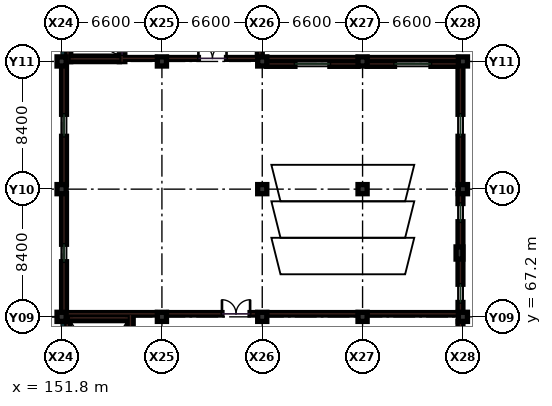
"""IFC4 building model, lengths in metres.
Left out: names, types, materials, properties, quantities, classifications, styles, units other than length and angle.
Written with IfcOpenShell. Run it as: python <this file> out.ifc"""

import sys

from ifc_helpers import new_model, si_unit, direction, frame, frame_2d, origin, origin_2d, place, context, subcontext, project, spatial, rectangle, extrude, element, fill, save


model = new_model("IFC4")
c1 = context("Model", 3, precision=1e-05, world=origin(), true_north=direction((0.0, 1.0)))
c2 = subcontext(c1, "Body", "Model", "MODEL_VIEW")
j1 = project(units=[si_unit("LENGTHUNIT", "METRE"), si_unit("PLANEANGLEUNIT", "RADIAN")], contexts=[c1])
p1 = place(None, origin())
s1 = spatial("IfcSite", under=j1, at=p1, CompositionType="ELEMENT")
p2 = place(p1, origin())
s2 = spatial("IfcBuilding", under=s1, at=p2, CompositionType="ELEMENT")
p3 = place(p2, origin())
s3 = spatial("IfcBuildingStorey", under=s2, at=p3, CompositionType="ELEMENT", Elevation=0.0)
for number, where, z_axis, x_axis in (
    (1, (151.8, 67.2, 0.0), (0.0, 0.0, 1.0), (1.0, 0.0, 0.0)),
    (2, (151.8, 75.6, 0.0), (0.0, 0.0, 1.0), (1.0, 0.0, 0.0)),
    (3, (151.8, 84.0, 0.0), (0.0, 0.0, 1.0), (1.0, 0.0, 0.0)),
    (4, (158.4, 67.2, 0.0), (0.0, 0.0, 1.0), (1.0, 0.0, 0.0)),
    (5, (158.4, 84.0, 0.0), (0.0, 0.0, 1.0), (1.0, 0.0, 0.0)),
    (6, (165.0, 67.2, 0.0), (0.0, 0.0, 1.0), (1.0, 0.0, 0.0)),
    (7, (165.0, 75.6, 0.0), (0.0, 0.0, 1.0), (1.0, 0.0, 0.0)),
    (8, (165.0, 84.0, 0.0), (0.0, 0.0, 1.0), (1.0, 0.0, 0.0)),
    (9, (171.6, 67.2, 0.0), (0.0, 0.0, 1.0), (1.0, 0.0, 0.0)),
    (10, (171.6, 75.6, 0.0), (0.0, 0.0, 1.0), (1.0, 0.0, 0.0)),
    (11, (171.6, 84.0, 0.0), (0.0, 0.0, 1.0), (1.0, 0.0, 0.0)),
    (12, (178.2, 67.2, 0.0), (0.0, 0.0, 1.0), (1.0, 0.0, 0.0)),
    (13, (178.2, 75.6, 0.0), (0.0, 0.0, 1.0), (1.0, 0.0, 0.0)),
    (14, (178.2, 84.0, 0.0), (0.0, 0.0, 1.0), (1.0, 0.0, 0.0)),
):
    element("IfcColumn", number, at=place(p3, frame(where, z_axis=z_axis, x_axis=x_axis)), inside=s3, PredefinedType="COLUMN", context=c2, shape_type="SweptSolid", body=[
        extrude(rectangle(XDim=0.6, YDim=0.6, at=origin_2d()), origin(), (0.0, 0.0, 1.0), 5.4),
    ])
p4 = place(p3, frame((177.975, 71.4, 0.0), z_axis=(0.0, 0.0, 1.0), x_axis=(1.0, 0.0, 0.0)))
e15 = element("IfcColumn", 15, at=p4, inside=s3, PredefinedType="PILASTER", context=c2, shape_type="SweptSolid", body=[
    extrude(rectangle(XDim=0.45, YDim=0.8, at=origin_2d()), origin(), (0.0, 0.0, 1.0), 5.4),
])
p5 = place(p3, frame((152.0, 67.4, 0.0), z_axis=(0.0, 0.0, 1.0), x_axis=(1.0, 0.0, 0.0)))
e16 = element("IfcWall", 16, at=p5, inside=s3, PredefinedType="PARTITIONING", context=c2, shape_type="SweptSolid", body=[
    extrude(rectangle(XDim=5.95, YDim=0.16, at=frame_2d((2.975, 0.0))), origin(), (0.0, 0.0, 1.0), 4.25),
])
p6 = place(p3, frame((158.85, 67.4, 0.0), z_axis=(0.0, 0.0, 1.0), x_axis=(1.0, 0.0, 0.0)))
e17 = element("IfcWall", 17, at=p6, inside=s3, PredefinedType="PARTITIONING", context=c2, shape_type="SweptSolid", body=[
    extrude(rectangle(XDim=5.7, YDim=0.16, at=frame_2d((2.85, 0.0))), origin(), (0.0, 0.0, 1.0), 4.235),
])
p7 = place(p6, frame((3.5, 0.0, 0.0)))
e18 = element("IfcOpeningElement", 18, at=p7, cuts=e17, PredefinedType="OPENING", context=c2, shape_type="SweptSolid", body=[
    extrude(rectangle(XDim=1.85, YDim=2.25, at=frame_2d((0.925, 1.125))), frame((0.0, 0.09, 0.0), z_axis=(0.0, -1.0, 0.0), x_axis=(1.0, 0.0, 0.0)), (0.0, 0.0, 1.0), 0.18),
])
p8 = place(p3, frame((165.45, 67.4, 0.0), z_axis=(0.0, 0.0, 1.0), x_axis=(1.0, 0.0, 0.0)))
e19 = element("IfcWall", 19, at=p8, inside=s3, PredefinedType="PARTITIONING", context=c2, shape_type="SweptSolid", body=[
    extrude(rectangle(XDim=5.7, YDim=0.16, at=frame_2d((2.85, 0.0))), origin(), (0.0, 0.0, 1.0), 4.235),
])
p9 = place(p3, frame((172.05, 67.4, 0.0), z_axis=(0.0, 0.0, 1.0), x_axis=(1.0, 0.0, 0.0)))
e20 = element("IfcWall", 20, at=p9, inside=s3, PredefinedType="PARTITIONING", context=c2, shape_type="SweptSolid", body=[
    extrude(rectangle(XDim=5.83, YDim=0.16, at=frame_2d((2.915, 0.0))), origin(), (0.0, 0.0, 1.0), 4.235),
])
p10 = place(p3, frame((155.8, 84.2, 0.0), z_axis=(0.0, 0.0, 1.0), x_axis=(1.0, 0.0, 0.0)))
e21 = element("IfcWall", 21, at=p10, inside=s3, PredefinedType="PARTITIONING", context=c2, shape_type="SweptSolid", body=[
    extrude(rectangle(XDim=2.15, YDim=0.12, at=frame_2d((1.075, 0.0))), origin(), (0.0, 0.0, 1.0), 4.235),
])
p11 = place(p3, frame((158.85, 84.2, 0.0), z_axis=(0.0, 0.0, 1.0), x_axis=(1.0, 0.0, 0.0)))
e22 = element("IfcWall", 22, at=p11, inside=s3, PredefinedType="PARTITIONING", context=c2, shape_type="SweptSolid", body=[
    extrude(rectangle(XDim=5.7, YDim=0.12, at=frame_2d((2.85, 0.0))), origin(), (0.0, 0.0, 1.0), 4.235),
])
p12 = place(p11, frame((1.95, 0.0, 0.0)))
e23 = element("IfcOpeningElement", 23, at=p12, cuts=e22, PredefinedType="OPENING", context=c2, shape_type="SweptSolid", body=[
    extrude(rectangle(XDim=1.85, YDim=2.25, at=frame_2d((0.925, 1.125))), frame((0.0, 0.07, 0.0), z_axis=(0.0, -1.0, 0.0), x_axis=(1.0, 0.0, 0.0)), (0.0, 0.0, 1.0), 0.14),
])
p13 = place(p3, frame((165.45, 84.2, 0.0), z_axis=(0.0, 0.0, 1.0), x_axis=(1.0, 0.0, 0.0)))
e24 = element("IfcWall", 24, at=p13, inside=s3, PredefinedType="PARTITIONING", context=c2, shape_type="SweptSolid", body=[
    extrude(rectangle(XDim=5.7, YDim=0.12, at=frame_2d((2.85, 0.0))), origin(), (0.0, 0.0, 1.0), 4.25),
])
p14 = place(p3, frame((172.05, 84.2, 0.0), z_axis=(0.0, 0.0, 1.0), x_axis=(1.0, 0.0, 0.0)))
e25 = element("IfcWall", 25, at=p14, inside=s3, PredefinedType="PARTITIONING", context=c2, shape_type="SweptSolid", body=[
    extrude(rectangle(XDim=5.83, YDim=0.12, at=frame_2d((2.915, 0.0))), origin(), (0.0, 0.0, 1.0), 4.25),
])
p15 = place(p3, frame((151.96, 75.305, 0.0), z_axis=(0.0, 0.0, 1.0), x_axis=(0.0, -1.0, 0.0)))
e26 = element("IfcWall", 26, at=p15, inside=s3, PredefinedType="SOLIDWALL", context=c2, shape_type="SweptSolid", body=[
    extrude(rectangle(XDim=7.81, YDim=0.32, at=frame_2d((3.905, 0.0))), origin(), (0.0, 0.0, 1.0), 4.335),
])
p16 = place(p15, frame((3.33, 0.0, 0.95)))
e27 = element("IfcOpeningElement", 27, at=p16, cuts=e26, PredefinedType="OPENING", context=c2, shape_type="SweptSolid", body=[
    extrude(rectangle(XDim=1.15, YDim=1.6, at=frame_2d((0.575, 0.8))), frame((0.0, 0.17, 0.0), z_axis=(0.0, -1.0, 0.0), x_axis=(1.0, 0.0, 0.0)), (0.0, 0.0, 1.0), 0.34),
])
p17 = place(p3, frame((151.96, 83.705, 0.0), z_axis=(0.0, 0.0, 1.0), x_axis=(0.0, -1.0, 0.0)))
e28 = element("IfcWall", 28, at=p17, inside=s3, PredefinedType="SOLIDWALL", context=c2, shape_type="SweptSolid", body=[
    extrude(rectangle(XDim=7.81, YDim=0.32, at=frame_2d((3.905, 0.0))), origin(), (0.0, 0.0, 1.0), 4.335),
])
p18 = place(p17, frame((3.18, 0.0, 0.95)))
e29 = element("IfcOpeningElement", 29, at=p18, cuts=e28, PredefinedType="OPENING", context=c2, shape_type="SweptSolid", body=[
    extrude(rectangle(XDim=1.45, YDim=1.6, at=frame_2d((0.725, 0.8))), frame((0.0, 0.17, 0.0), z_axis=(0.0, -1.0, 0.0), x_axis=(1.0, 0.0, 0.0)), (0.0, 0.0, 1.0), 0.34),
])
p19 = place(p3, frame((164.84, 84.295, 0.0), z_axis=(0.0, 0.0, 1.0), x_axis=(0.0, 1.0, 0.0)))
e30 = element("IfcWall", 30, at=p19, inside=s3, PredefinedType="SOLIDWALL", context=c2, shape_type="SweptSolid", body=[
    extrude(rectangle(XDim=7.81, YDim=0.32, at=frame_2d((3.905, 0.0))), origin(), (0.0, 0.0, 1.0), 4.335),
])
p20 = place(p19, frame((3.005, 0.0, 0.95)))
e31 = element("IfcOpeningElement", 31, at=p20, cuts=e30, PredefinedType="OPENING", context=c2, shape_type="SweptSolid", body=[
    extrude(rectangle(XDim=1.8, YDim=1.6, at=frame_2d((0.9, 0.8))), frame((0.0, 0.17, 0.0), z_axis=(0.0, -1.0, 0.0), x_axis=(1.0, 0.0, 0.0)), (0.0, 0.0, 1.0), 0.34),
])
p21 = place(p3, frame((171.305, 83.84, 0.0), z_axis=(0.0, 0.0, 1.0), x_axis=(-1.0, 0.0, 0.0)))
e32 = element("IfcWall", 32, at=p21, inside=s3, PredefinedType="SOLIDWALL", context=c2, shape_type="SweptSolid", body=[
    extrude(rectangle(XDim=6.01, YDim=0.32, at=frame_2d((3.005, 0.0))), origin(), (0.0, 0.0, 1.0), 4.385),
])
p22 = place(p21, frame((1.855, 0.0, 0.95)))
e33 = element("IfcOpeningElement", 33, at=p22, cuts=e32, PredefinedType="OPENING", context=c2, shape_type="SweptSolid", body=[
    extrude(rectangle(XDim=2.3, YDim=1.95, at=frame_2d((1.15, 0.975))), frame((0.0, 0.17, 0.0), z_axis=(0.0, -1.0, 0.0), x_axis=(1.0, 0.0, 0.0)), (0.0, 0.0, 1.0), 0.34),
])
p23 = place(p3, frame((178.04, 59.195, 0.0), z_axis=(0.0, 0.0, 1.0), x_axis=(0.0, 1.0, 0.0)))
e34 = element("IfcWall", 34, at=p23, inside=s3, PredefinedType="SOLIDWALL", context=c2, shape_type="SweptSolid", body=[
    extrude(rectangle(XDim=7.71, YDim=0.32, at=frame_2d((3.855, 0.0))), origin(), (0.0, 0.0, 1.0), 4.335),
])
p24 = place(p23, frame((0.65, 0.0, 0.95)))
e35 = element("IfcOpeningElement", 35, at=p24, cuts=e34, PredefinedType="OPENING", context=c2, shape_type="SweptSolid", body=[
    extrude(rectangle(XDim=1.2, YDim=1.5, at=frame_2d((0.6, 0.75))), frame((0.0, 0.17, 0.0), z_axis=(0.0, -1.0, 0.0), x_axis=(1.0, 0.0, 0.0)), (0.0, 0.0, 1.0), 0.34),
])
p25 = place(p23, frame((5.86, 0.0, 0.95)))
e36 = element("IfcOpeningElement", 36, at=p25, cuts=e34, PredefinedType="OPENING", context=c2, shape_type="SweptSolid", body=[
    extrude(rectangle(XDim=1.2, YDim=1.5, at=frame_2d((0.6, 0.75))), frame((0.0, 0.17, 0.0), z_axis=(0.0, -1.0, 0.0), x_axis=(1.0, 0.0, 0.0)), (0.0, 0.0, 1.0), 0.34),
])
p26 = place(p3, frame((178.04, 67.495, 0.0), z_axis=(0.0, 0.0, 1.0), x_axis=(0.0, 1.0, 0.0)))
e37 = element("IfcWall", 37, at=p26, inside=s3, PredefinedType="SOLIDWALL", context=c2, shape_type="SweptSolid", body=[
    extrude(rectangle(XDim=7.81, YDim=0.32, at=frame_2d((3.905, 0.0))), origin(), (0.0, 0.0, 1.0), 4.335),
])
p27 = place(p26, frame((0.65, 0.0, 0.95)))
e38 = element("IfcOpeningElement", 38, at=p27, cuts=e37, PredefinedType="OPENING", context=c2, shape_type="SweptSolid", body=[
    extrude(rectangle(XDim=1.2, YDim=1.5, at=frame_2d((0.6, 0.75))), frame((0.0, 0.17, 0.0), z_axis=(0.0, -1.0, 0.0), x_axis=(1.0, 0.0, 0.0)), (0.0, 0.0, 1.0), 0.34),
])
p28 = place(p26, frame((5.96, 0.0, 0.95)))
e39 = element("IfcOpeningElement", 39, at=p28, cuts=e37, PredefinedType="OPENING", context=c2, shape_type="SweptSolid", body=[
    extrude(rectangle(XDim=1.2, YDim=1.5, at=frame_2d((0.6, 0.75))), frame((0.0, 0.17, 0.0), z_axis=(0.0, -1.0, 0.0), x_axis=(1.0, 0.0, 0.0)), (0.0, 0.0, 1.0), 0.34),
])
p29 = place(p3, frame((178.04, 75.895, 0.0), z_axis=(0.0, 0.0, 1.0), x_axis=(0.0, 1.0, 0.0)))
e40 = element("IfcWall", 40, at=p29, inside=s3, PredefinedType="SOLIDWALL", context=c2, shape_type="SweptSolid", body=[
    extrude(rectangle(XDim=7.81, YDim=0.32, at=frame_2d((3.905, 0.0))), origin(), (0.0, 0.0, 1.0), 4.335),
])
p30 = place(p29, frame((3.18, 0.0, 0.95)))
e41 = element("IfcOpeningElement", 41, at=p30, cuts=e40, PredefinedType="OPENING", context=c2, shape_type="SweptSolid", body=[
    extrude(rectangle(XDim=1.45, YDim=1.6, at=frame_2d((0.725, 0.8))), frame((0.0, 0.17, 0.0), z_axis=(0.0, -1.0, 0.0), x_axis=(1.0, 0.0, 0.0)), (0.0, 0.0, 1.0), 0.34),
])
p31 = place(p3, frame((177.905, 83.84, 0.0), z_axis=(0.0, 0.0, 1.0), x_axis=(-1.0, 0.0, 0.0)))
e42 = element("IfcWall", 42, at=p31, inside=s3, PredefinedType="SOLIDWALL", context=c2, shape_type="SweptSolid", body=[
    extrude(rectangle(XDim=6.01, YDim=0.32, at=frame_2d((3.005, 0.0))), origin(), (0.0, 0.0, 1.0), 4.385),
])
p32 = place(p31, frame((1.805, 0.0, 0.95)))
e43 = element("IfcOpeningElement", 43, at=p32, cuts=e42, PredefinedType="OPENING", context=c2, shape_type="SweptSolid", body=[
    extrude(rectangle(XDim=2.4, YDim=1.6, at=frame_2d((1.2, 0.8))), frame((0.0, 0.17, 0.0), z_axis=(0.0, -1.0, 0.0), x_axis=(1.0, 0.0, 0.0)), (0.0, 0.0, 1.0), 0.34),
])
p33 = place(p3, frame((152.17, 58.69, 0.0), z_axis=(0.0, 0.0, 1.0), x_axis=(0.0, 1.0, 0.0)))
e44 = element("IfcWall", 44, at=p33, inside=s3, PredefinedType="SHEAR", context=c2, shape_type="SweptSolid", body=[
    extrude(rectangle(XDim=8.62, YDim=0.36, at=frame_2d((4.31, 0.0))), origin(), (0.0, 0.0, 1.0), 5.1),
])
p34 = place(p3, frame((156.33, 58.69, 0.0), z_axis=(0.0, 0.0, 1.0), x_axis=(0.0, 1.0, 0.0)))
e45 = element("IfcWall", 45, at=p34, inside=s3, PredefinedType="SHEAR", context=c2, shape_type="SweptSolid", body=[
    extrude(rectangle(XDim=8.62, YDim=0.36, at=frame_2d((4.31, 0.0))), origin(), (0.0, 0.0, 1.0), 5.1),
])
p35 = place(p34, frame((0.45, 0.0, 0.0)))
e46 = element("IfcOpeningElement", 46, at=p35, cuts=e45, PredefinedType="OPENING", context=c2, shape_type="SweptSolid", body=[
    extrude(rectangle(XDim=1.25, YDim=2.15, at=frame_2d((0.625, 1.075))), frame((0.0, 0.19, 0.0), z_axis=(0.0, -1.0, 0.0), x_axis=(1.0, 0.0, 0.0)), (0.0, 0.0, 1.0), 0.38),
])
p36 = place(p3, frame((152.35, 67.13, 0.0), z_axis=(0.0, 0.0, 1.0), x_axis=(1.0, 0.0, 0.0)))
e47 = element("IfcWall", 47, at=p36, inside=s3, PredefinedType="SHEAR", context=c2, shape_type="SweptSolid", body=[
    extrude(rectangle(XDim=3.8, YDim=0.36, at=frame_2d((1.9, 0.0))), origin(), (0.0, 0.0, 1.0), 5.1),
])
p37 = place(p3, frame((152.22, 83.99, 0.0), z_axis=(0.0, 0.0, 1.0), x_axis=(0.0, 1.0, 0.0)))
e48 = element("IfcWall", 48, at=p37, inside=s3, PredefinedType="SHEAR", context=c2, shape_type="SweptSolid", body=[
    extrude(rectangle(XDim=8.17, YDim=0.36, at=frame_2d((4.085, 0.0))), origin(), (0.0, 0.0, 1.0), 5.1),
])
p38 = place(p3, frame((155.78, 83.99, 0.0), z_axis=(0.0, 0.0, 1.0), x_axis=(0.0, 1.0, 0.0)))
e49 = element("IfcWall", 49, at=p38, inside=s3, PredefinedType="SHEAR", context=c2, shape_type="SweptSolid", body=[
    extrude(rectangle(XDim=8.17, YDim=0.36, at=frame_2d((4.085, 0.0))), origin(), (0.0, 0.0, 1.0), 5.1),
])
p39 = place(p38, frame((0.45, 0.0, 0.0)))
e50 = element("IfcOpeningElement", 50, at=p39, cuts=e49, PredefinedType="OPENING", context=c2, shape_type="SweptSolid", body=[
    extrude(rectangle(XDim=1.25, YDim=2.15, at=frame_2d((0.625, 1.075))), frame((0.0, 0.19, 0.0), z_axis=(0.0, -1.0, 0.0), x_axis=(1.0, 0.0, 0.0)), (0.0, 0.0, 1.0), 0.38),
])
p40 = place(p3, frame((152.4, 84.17, 0.0), z_axis=(0.0, 0.0, 1.0), x_axis=(1.0, 0.0, 0.0)))
e51 = element("IfcWall", 51, at=p40, inside=s3, PredefinedType="SHEAR", context=c2, shape_type="SweptSolid", body=[
    extrude(rectangle(XDim=3.2, YDim=0.36, at=frame_2d((1.6, 0.0))), origin(), (0.0, 0.0, 1.0), 5.1),
])
p41 = place(p7, origin())
e52 = element("IfcDoor", 52, at=p41, inside=s3, OperationType="DOUBLE_DOOR_SINGLE_SWING", PredefinedType="DOOR", context=c2, shape_type="SweptSolid", body=[
    extrude(rectangle(XDim=1.85, YDim=2.25, at=frame_2d((0.925, 1.125))), frame((0.0, 0.025, 0.0), z_axis=(0.0, -1.0, 0.0), x_axis=(1.0, 0.0, 0.0)), (0.0, 0.0, 1.0), 0.05),
])
fill(e18, e52)
p42 = place(p12, origin())
e53 = element("IfcDoor", 53, at=p42, inside=s3, OperationType="DOUBLE_DOOR_SINGLE_SWING", PredefinedType="DOOR", context=c2, shape_type="SweptSolid", body=[
    extrude(rectangle(XDim=1.85, YDim=2.25, at=frame_2d((0.925, 1.125))), frame((0.0, 0.025, 0.0), z_axis=(0.0, -1.0, 0.0), x_axis=(1.0, 0.0, 0.0)), (0.0, 0.0, 1.0), 0.05),
])
fill(e23, e53)
p43 = place(p16, origin())
e54 = element("IfcWindow", 54, at=p43, inside=s3, PartitioningType="SINGLE_PANEL", PredefinedType="WINDOW", context=c2, shape_type="SweptSolid", body=[
    extrude(rectangle(XDim=1.15, YDim=1.6, at=frame_2d((0.575, 0.8))), frame((0.0, 0.03, 0.0), z_axis=(0.0, -1.0, 0.0), x_axis=(1.0, 0.0, 0.0)), (0.0, 0.0, 1.0), 0.06),
])
fill(e27, e54)
p44 = place(p18, origin())
e55 = element("IfcWindow", 55, at=p44, inside=s3, PartitioningType="SINGLE_PANEL", PredefinedType="WINDOW", context=c2, shape_type="SweptSolid", body=[
    extrude(rectangle(XDim=1.45, YDim=1.6, at=frame_2d((0.725, 0.8))), frame((0.0, 0.03, 0.0), z_axis=(0.0, -1.0, 0.0), x_axis=(1.0, 0.0, 0.0)), (0.0, 0.0, 1.0), 0.06),
])
fill(e29, e55)
p45 = place(p22, origin())
e56 = element("IfcWindow", 56, at=p45, inside=s3, PartitioningType="SINGLE_PANEL", PredefinedType="WINDOW", context=c2, shape_type="SweptSolid", body=[
    extrude(rectangle(XDim=2.3, YDim=1.95, at=frame_2d((1.15, 0.975))), frame((0.0, 0.03, 0.0), z_axis=(0.0, -1.0, 0.0), x_axis=(1.0, 0.0, 0.0)), (0.0, 0.0, 1.0), 0.06),
])
fill(e33, e56)
p46 = place(p27, origin())
e57 = element("IfcWindow", 57, at=p46, inside=s3, PartitioningType="SINGLE_PANEL", PredefinedType="WINDOW", context=c2, shape_type="SweptSolid", body=[
    extrude(rectangle(XDim=1.2, YDim=1.5, at=frame_2d((0.6, 0.75))), frame((0.0, 0.03, 0.0), z_axis=(0.0, -1.0, 0.0), x_axis=(1.0, 0.0, 0.0)), (0.0, 0.0, 1.0), 0.06),
])
fill(e38, e57)
p47 = place(p28, origin())
e58 = element("IfcWindow", 58, at=p47, inside=s3, PartitioningType="SINGLE_PANEL", PredefinedType="WINDOW", context=c2, shape_type="SweptSolid", body=[
    extrude(rectangle(XDim=1.2, YDim=1.5, at=frame_2d((0.6, 0.75))), frame((0.0, 0.03, 0.0), z_axis=(0.0, -1.0, 0.0), x_axis=(1.0, 0.0, 0.0)), (0.0, 0.0, 1.0), 0.06),
])
fill(e39, e58)
p48 = place(p30, origin())
e59 = element("IfcWindow", 59, at=p48, inside=s3, PartitioningType="SINGLE_PANEL", PredefinedType="WINDOW", context=c2, shape_type="SweptSolid", body=[
    extrude(rectangle(XDim=1.45, YDim=1.6, at=frame_2d((0.725, 0.8))), frame((0.0, 0.03, 0.0), z_axis=(0.0, -1.0, 0.0), x_axis=(1.0, 0.0, 0.0)), (0.0, 0.0, 1.0), 0.06),
])
fill(e41, e59)
p49 = place(p32, origin())
e60 = element("IfcWindow", 60, at=p49, inside=s3, PartitioningType="SINGLE_PANEL", PredefinedType="WINDOW", context=c2, shape_type="SweptSolid", body=[
    extrude(rectangle(XDim=2.4, YDim=1.6, at=frame_2d((1.2, 0.8))), frame((0.0, 0.03, 0.0), z_axis=(0.0, -1.0, 0.0), x_axis=(1.0, 0.0, 0.0)), (0.0, 0.0, 1.0), 0.06),
])
fill(e43, e60)
p50 = place(p39, origin())
e61 = element("IfcDoor", 61, at=p50, inside=s3, OperationType="SINGLE_SWING_RIGHT", PredefinedType="DOOR", context=c2, shape_type="SweptSolid", body=[
    extrude(rectangle(XDim=1.25, YDim=2.15, at=frame_2d((0.625, 1.075))), frame((0.0, 0.025, 0.0), z_axis=(0.0, -1.0, 0.0), x_axis=(1.0, 0.0, 0.0)), (0.0, 0.0, 1.0), 0.05),
])
fill(e50, e61)
save(model, sys.argv[1])
